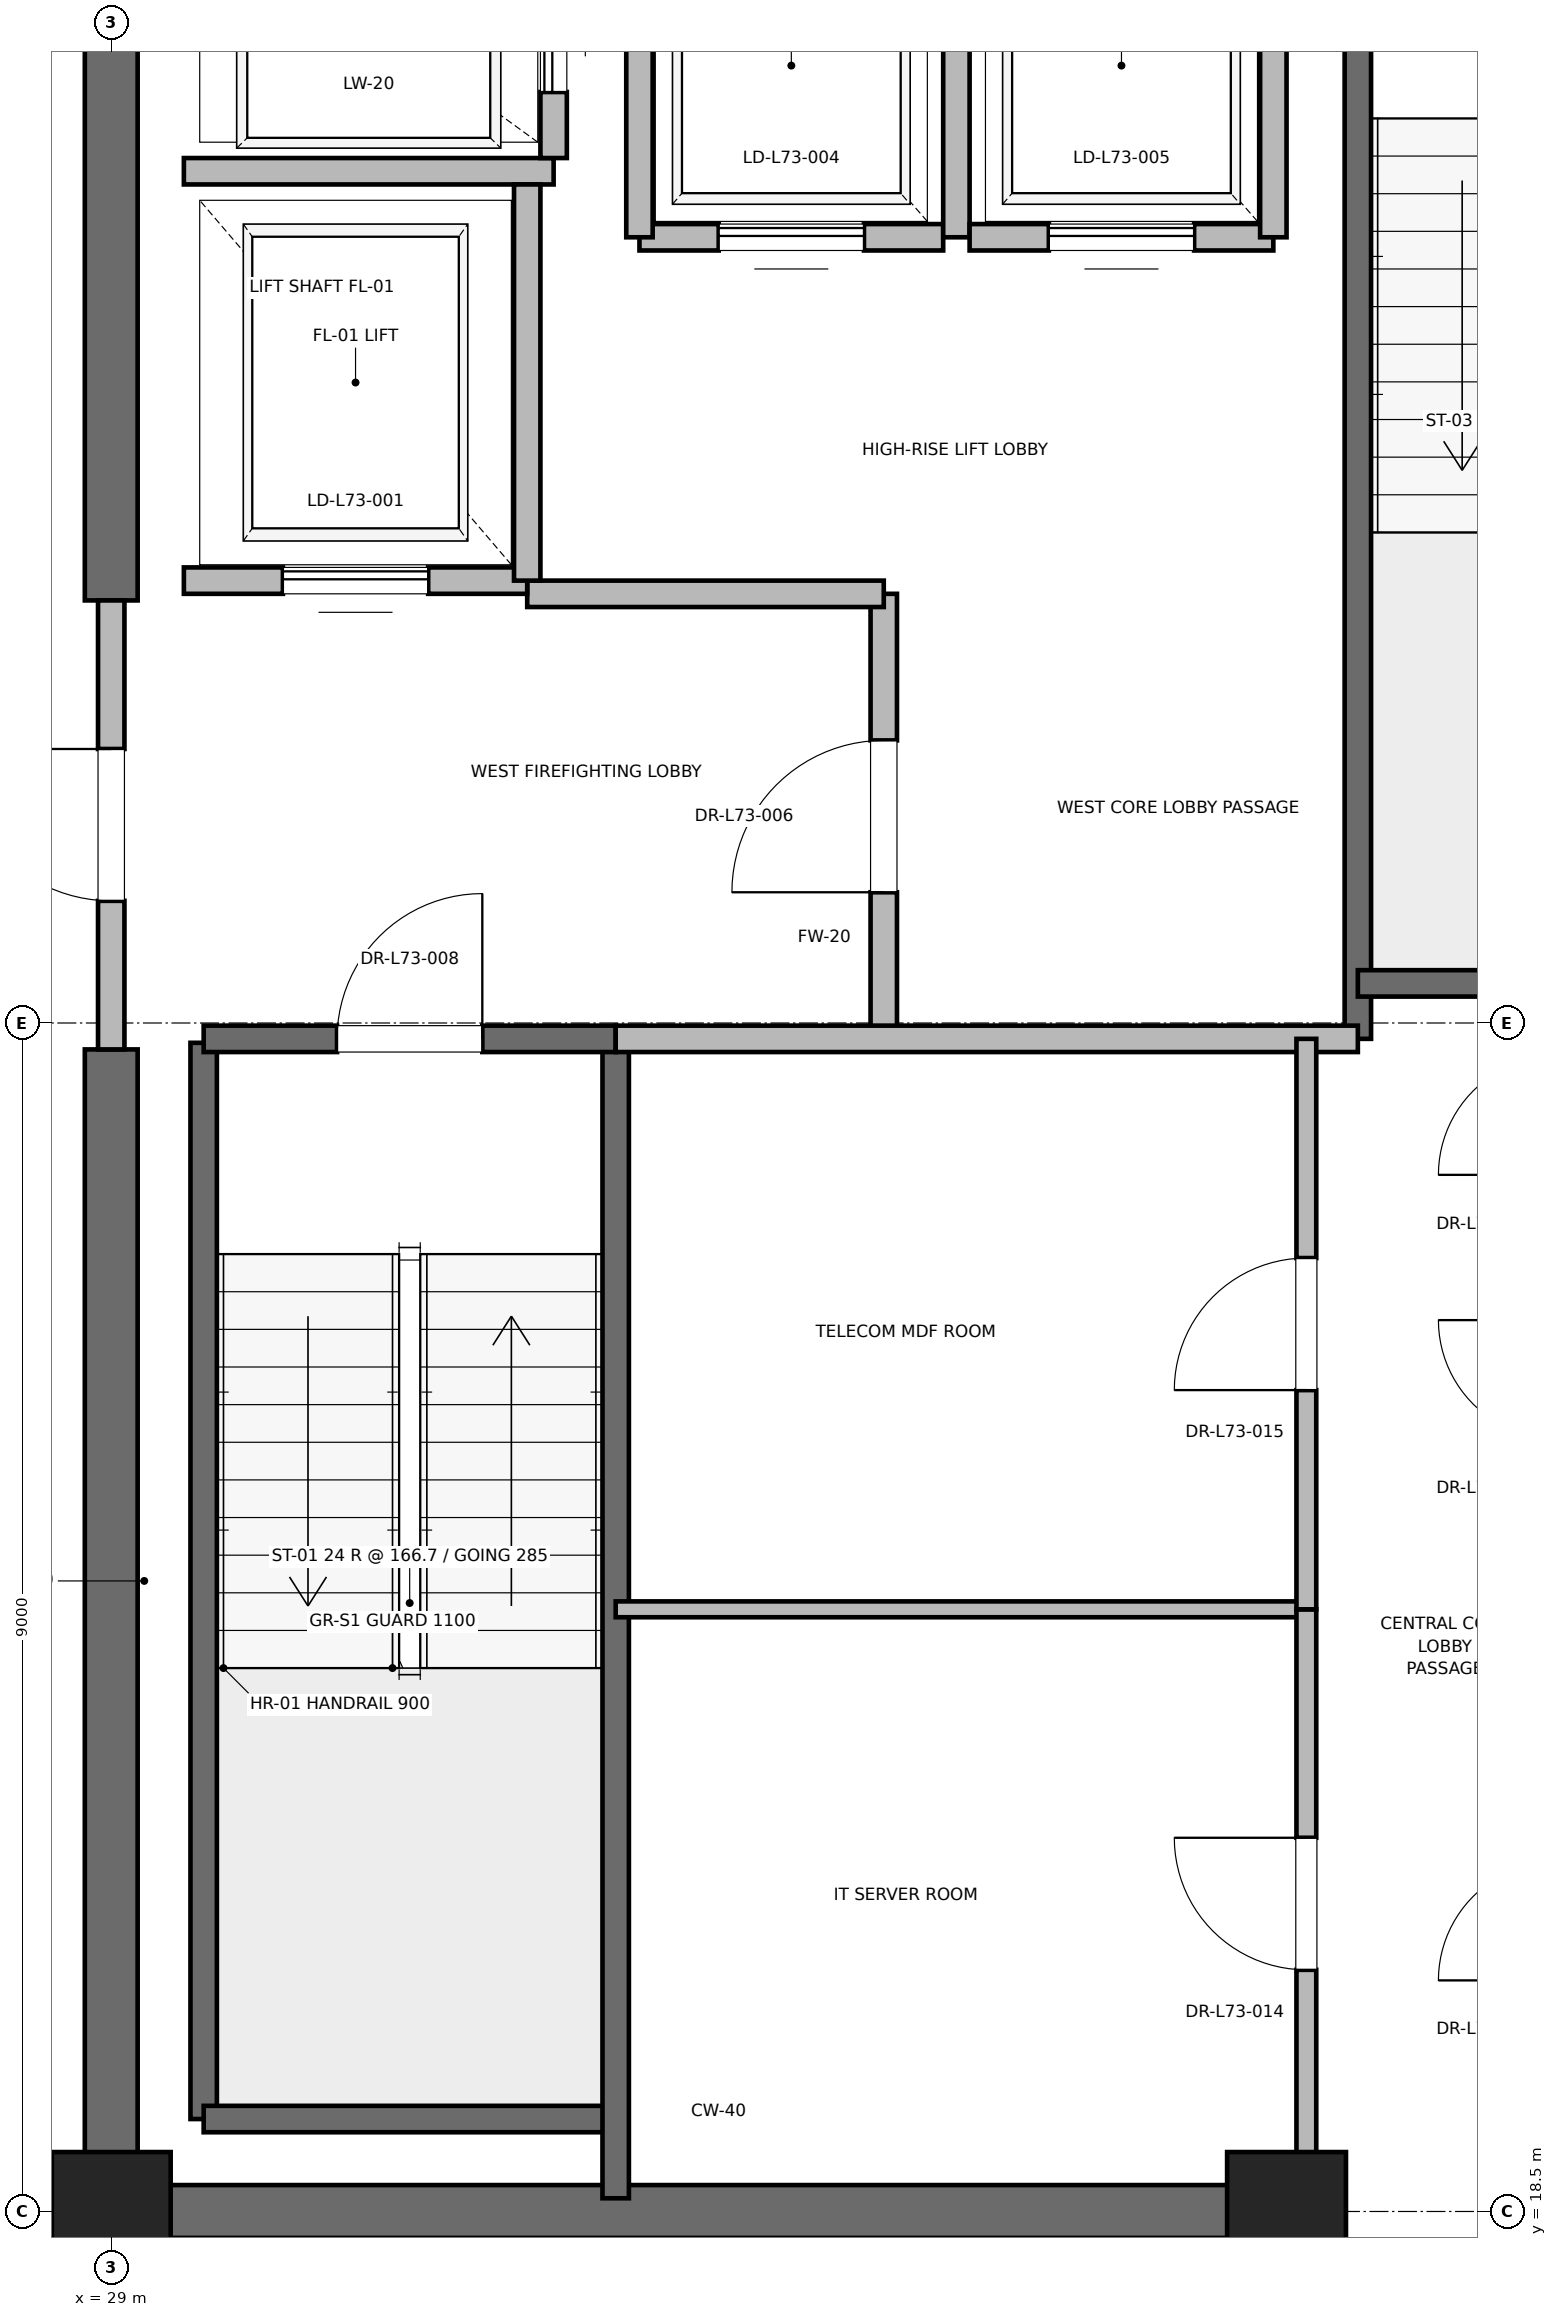
"""IFC4 building model, lengths in metres.
Left out: names, types, materials, properties, quantities, classifications, styles, units other than length and angle.
Written with IfcOpenShell. Run it as: python <this file> out.ifc"""

import sys

from ifc_helpers import new_model, si_unit, direction, frame, frame_2d, origin, origin_2d, place, context, subcontext, project, spatial, rectangle, extrude, element, fill, save


model = new_model("IFC4")
c1 = context("Model", 3, precision=1e-05, world=origin(), true_north=direction((0.0, 1.0)))
c2 = subcontext(c1, "Body", "Model", "MODEL_VIEW")
j1 = project(units=[si_unit("LENGTHUNIT", "METRE"), si_unit("PLANEANGLEUNIT", "RADIAN")], contexts=[c1])
p1 = place(None, origin())
s1 = spatial("IfcSite", under=j1, at=p1, CompositionType="ELEMENT")
p2 = place(p1, origin())
s2 = spatial("IfcBuilding", under=s1, at=p2, CompositionType="ELEMENT")
p3 = place(p2, frame((0.0, 0.0, 314.8)))
s3 = spatial("IfcBuildingStorey", under=s2, at=p3, CompositionType="ELEMENT", Elevation=314.8)
for number, where, z_axis, x_axis in (
    (1, (29.0, 18.5, 0.0), (0.0, 0.0, 1.0), (1.0, 0.0, 0.0)),
    (2, (37.9, 18.5, 0.0), (0.0, 0.0, 1.0), (1.0, 0.0, 0.0)),
):
    element("IfcColumn", number, at=place(p3, frame(where, z_axis=z_axis, x_axis=x_axis)), inside=s3, PredefinedType="PILASTER", context=c2, shape_type="SweptSolid", body=[
        extrude(rectangle(XDim=0.9, YDim=0.9, at=origin_2d()), origin(), (0.0, 0.0, 1.0), 4.0),
    ])
p4 = place(p3, frame((29.0, 18.5, 0.0), z_axis=(0.0, 0.0, 1.0), x_axis=(1.0, 0.0, 0.0)))
e3 = element("IfcWall", 3, at=p4, inside=s3, PredefinedType="SHEAR", context=c2, shape_type="SweptSolid", body=[
    extrude(rectangle(XDim=9.2, YDim=0.4, at=frame_2d((4.6, 0.0))), origin(), (0.0, 0.0, 1.0), 3.785),
])
p5 = place(p3, frame((29.0, 18.5, 0.0), z_axis=(0.0, 0.0, 1.0), x_axis=(0.0, 1.0, 0.0)))
e4 = element("IfcWall", 4, at=p5, inside=s3, PredefinedType="SHEAR", context=c2, shape_type="SweptSolid", body=[
    extrude(rectangle(XDim=8.8, YDim=0.4, at=frame_2d((4.4, 0.0))), origin(), (0.0, 0.0, 1.0), 3.785),
])
p6 = place(p3, frame((29.0, 30.7, 0.0), z_axis=(0.0, 0.0, 1.0), x_axis=(0.0, 1.0, 0.0)))
e5 = element("IfcWall", 5, at=p6, inside=s3, PredefinedType="SHEAR", context=c2, shape_type="SweptSolid", body=[
    extrude(rectangle(XDim=5.8, YDim=0.4, at=frame_2d((2.9, 0.0))), origin(), (0.0, 0.0, 1.0), 3.785),
])
p7 = place(p3, frame((29.7, 19.2, 0.0), z_axis=(0.0, 0.0, 1.0), x_axis=(0.0, 1.0, 0.0)))
e6 = element("IfcWall", 6, at=p7, inside=s3, PredefinedType="SOLIDWALL", context=c2, shape_type="SweptSolid", body=[
    extrude(rectangle(XDim=8.15, YDim=0.2, at=frame_2d((4.075, 0.0))), origin(), (0.0, 0.0, 1.0), 3.785),
])
p8 = place(p3, frame((29.7, 19.2, 0.0), z_axis=(0.0, 0.0, 1.0), x_axis=(1.0, 0.0, 0.0)))
e7 = element("IfcWall", 7, at=p8, inside=s3, PredefinedType="SOLIDWALL", context=c2, shape_type="SweptSolid", body=[
    extrude(rectangle(XDim=3.12, YDim=0.2, at=frame_2d((1.56, 0.0))), origin(), (0.0, 0.0, 1.0), 3.785),
])
p9 = place(p3, frame((32.82, 18.6, 0.0), z_axis=(0.0, 0.0, 1.0), x_axis=(0.0, 1.0, 0.0)))
e8 = element("IfcWall", 8, at=p9, inside=s3, PredefinedType="SOLIDWALL", context=c2, shape_type="SweptSolid", body=[
    extrude(rectangle(XDim=8.78, YDim=0.2, at=frame_2d((4.39, 0.0))), origin(), (0.0, 0.0, 1.0), 3.785),
])
p10 = place(p3, frame((29.7, 27.38, 0.0), z_axis=(0.0, 0.0, 1.0), x_axis=(1.0, 0.0, 0.0)))
e9 = element("IfcWall", 9, at=p10, inside=s3, PredefinedType="SOLIDWALL", context=c2, shape_type="SweptSolid", body=[
    extrude(rectangle(XDim=3.12, YDim=0.2, at=frame_2d((1.56, 0.0))), origin(), (0.0, 0.0, 1.0), 3.785),
])
p11 = place(p10, frame((1.01, 0.0, 0.0)))
e10 = element("IfcOpeningElement", 10, at=p11, cuts=e9, PredefinedType="OPENING", context=c2, shape_type="SweptSolid", body=[
    extrude(rectangle(XDim=1.1, YDim=2.15, at=frame_2d((0.55, 1.075))), frame((0.0, 0.1, 0.0), z_axis=(0.0, -1.0, 0.0), x_axis=(1.0, 0.0, 0.0)), (0.0, 0.0, 1.0), 0.2),
])
p12 = place(p3, frame((38.44, 27.38, 0.0), z_axis=(0.0, 0.0, 1.0), x_axis=(0.0, 1.0, 0.0)))
e11 = element("IfcWall", 11, at=p12, inside=s3, PredefinedType="SOLIDWALL", context=c2, shape_type="SweptSolid", body=[
    extrude(rectangle(XDim=8.87, YDim=0.2, at=frame_2d((4.435, 0.0))), origin(), (0.0, 0.0, 1.0), 3.785),
])
p13 = place(p3, frame((38.44, 27.8, 0.0), z_axis=(0.0, 0.0, 1.0), x_axis=(1.0, 0.0, 0.0)))
e12 = element("IfcWall", 12, at=p13, inside=s3, PredefinedType="SOLIDWALL", context=c2, shape_type="SweptSolid", body=[
    extrude(rectangle(XDim=3.32, YDim=0.2, at=frame_2d((1.66, 0.0))), origin(), (0.0, 0.0, 1.0), 3.785),
])
p14 = place(p3, frame((34.85, 27.38, 0.0), z_axis=(0.0, 0.0, 1.0), x_axis=(0.0, 1.0, 0.0)))
e13 = element("IfcWall", 13, at=p14, inside=s3, PredefinedType="PARTITIONING", context=c2, shape_type="SweptSolid", body=[
    extrude(rectangle(XDim=3.37, YDim=0.2, at=frame_2d((1.685, 0.0))), origin(), (0.0, 0.0, 1.0), 3.785),
])
p15 = place(p14, frame((1.11, 0.0, 0.0)))
e14 = element("IfcOpeningElement", 14, at=p15, cuts=e13, PredefinedType="OPENING", context=c2, shape_type="SweptSolid", body=[
    extrude(rectangle(XDim=1.15, YDim=2.2, at=frame_2d((0.575, 1.1))), frame((0.0, 0.1, 0.0), z_axis=(0.0, -1.0, 0.0), x_axis=(1.0, 0.0, 0.0)), (0.0, 0.0, 1.0), 0.2),
])
p16 = place(p3, frame((29.0, 27.3, 0.0), z_axis=(0.0, 0.0, 1.0), x_axis=(0.0, 1.0, 0.0)))
e15 = element("IfcWall", 15, at=p16, inside=s3, PredefinedType="PARTITIONING", context=c2, shape_type="SweptSolid", body=[
    extrude(rectangle(XDim=3.4, YDim=0.2, at=frame_2d((1.7, 0.0))), origin(), (0.0, 0.0, 1.0), 2.865),
])
p17 = place(p16, frame((1.125, 0.0, 0.0)))
e16 = element("IfcOpeningElement", 16, at=p17, cuts=e15, PredefinedType="OPENING", context=c2, shape_type="SweptSolid", body=[
    extrude(rectangle(XDim=1.15, YDim=2.2, at=frame_2d((0.575, 1.1))), frame((0.0, 0.1, 0.0), z_axis=(0.0, -1.0, 0.0), x_axis=(1.0, 0.0, 0.0)), (0.0, 0.0, 1.0), 0.2),
])
p18 = place(p3, frame((32.82, 27.38, 0.0), z_axis=(0.0, 0.0, 1.0), x_axis=(1.0, 0.0, 0.0)))
e17 = element("IfcWall", 17, at=p18, inside=s3, PredefinedType="PARTITIONING", context=c2, shape_type="SweptSolid", body=[
    extrude(rectangle(XDim=5.62, YDim=0.2, at=frame_2d((2.81, 0.0))), origin(), (0.0, 0.0, 1.0), 3.785),
])
p19 = place(p3, frame((32.15, 30.75, 0.0), z_axis=(0.0, 0.0, 1.0), x_axis=(1.0, 0.0, 0.0)))
e18 = element("IfcWall", 18, at=p19, inside=s3, PredefinedType="PARTITIONING", context=c2, shape_type="SweptSolid", body=[
    extrude(rectangle(XDim=2.7, YDim=0.2, at=frame_2d((1.35, 0.0))), origin(), (0.0, 0.0, 1.0), 3.785),
])
p20 = place(p3, frame((29.55, 30.85, 0.0), z_axis=(0.0, 0.0, 1.0), x_axis=(1.0, 0.0, 0.0)))
e19 = element("IfcWall", 19, at=p20, inside=s3, PredefinedType="SOLIDWALL", context=c2, shape_type="SweptSolid", body=[
    extrude(rectangle(XDim=2.6, YDim=0.2, at=frame_2d((1.3, 0.0))), origin(), (0.0, 0.0, 1.0), 2.865),
])
p21 = place(p20, frame((0.75, 0.0, 0.0)))
e20 = element("IfcOpeningElement", 20, at=p21, cuts=e19, PredefinedType="OPENING", context=c2, shape_type="SweptSolid", body=[
    extrude(rectangle(XDim=1.1, YDim=2.2, at=frame_2d((0.55, 1.1))), frame((0.0, 0.1, 0.0), z_axis=(0.0, -1.0, 0.0), x_axis=(1.0, 0.0, 0.0)), (0.0, 0.0, 1.0), 0.2),
])
p22 = place(p3, frame((29.55, 33.95, 0.0), z_axis=(0.0, 0.0, 1.0), x_axis=(1.0, 0.0, 0.0)))
e21 = element("IfcWall", 21, at=p22, inside=s3, PredefinedType="SOLIDWALL", context=c2, shape_type="SweptSolid", body=[
    extrude(rectangle(XDim=2.8, YDim=0.2, at=frame_2d((1.4, 0.0))), origin(), (0.0, 0.0, 1.0), 3.785),
])
p23 = place(p3, frame((32.15, 30.85, 0.0), z_axis=(0.0, 0.0, 1.0), x_axis=(0.0, 1.0, 0.0)))
e22 = element("IfcWall", 22, at=p23, inside=s3, PredefinedType="SOLIDWALL", context=c2, shape_type="SweptSolid", body=[
    extrude(rectangle(XDim=3.0, YDim=0.2, at=frame_2d((1.5, 0.0))), origin(), (0.0, 0.0, 1.0), 3.785),
])
p24 = place(p3, frame((32.35, 34.05, 0.0), z_axis=(0.0, 0.0, 1.0), x_axis=(0.0, 1.0, 0.0)))
e23 = element("IfcWall", 23, at=p24, inside=s3, PredefinedType="SOLIDWALL", context=c2, shape_type="SweptSolid", body=[
    extrude(rectangle(XDim=2.1, YDim=0.2, at=frame_2d((1.05, 0.0))), origin(), (0.0, 0.0, 1.0), 3.785),
])
p25 = place(p24, frame((0.5, 0.0, 0.0)))
e24 = element("IfcOpeningElement", 24, at=p25, cuts=e23, PredefinedType="OPENING", context=c2, shape_type="SweptSolid", body=[
    extrude(rectangle(XDim=1.1, YDim=2.2, at=frame_2d((0.55, 1.1))), frame((0.0, 0.1, 0.0), z_axis=(0.0, -1.0, 0.0), x_axis=(1.0, 0.0, 0.0)), (0.0, 0.0, 1.0), 0.2),
])
p26 = place(p3, frame((33.0, 33.45, 0.0), z_axis=(0.0, 0.0, 1.0), x_axis=(1.0, 0.0, 0.0)))
e25 = element("IfcWall", 25, at=p26, inside=s3, PredefinedType="SOLIDWALL", context=c2, shape_type="SweptSolid", body=[
    extrude(rectangle(XDim=2.3, YDim=0.2, at=frame_2d((1.15, 0.0))), origin(), (0.0, 0.0, 1.0), 3.785),
])
p27 = place(p26, frame((0.6, 0.0, 0.0)))
e26 = element("IfcOpeningElement", 26, at=p27, cuts=e25, PredefinedType="OPENING", context=c2, shape_type="SweptSolid", body=[
    extrude(rectangle(XDim=1.1, YDim=2.2, at=frame_2d((0.55, 1.1))), frame((0.0, 0.1, 0.0), z_axis=(0.0, -1.0, 0.0), x_axis=(1.0, 0.0, 0.0)), (0.0, 0.0, 1.0), 0.2),
])
p28 = place(p3, frame((33.0, 36.05, 0.0), z_axis=(0.0, 0.0, 1.0), x_axis=(0.0, -1.0, 0.0)))
e27 = element("IfcWall", 27, at=p28, inside=s3, PredefinedType="SOLIDWALL", context=c2, shape_type="SweptSolid", body=[
    extrude(rectangle(XDim=2.6, YDim=0.2, at=frame_2d((1.3, 0.0))), origin(), (0.0, 0.0, 1.0), 3.785),
])
p29 = place(p3, frame((35.4, 33.45, 0.0), z_axis=(0.0, 0.0, 1.0), x_axis=(0.0, 1.0, 0.0)))
e28 = element("IfcWall", 28, at=p29, inside=s3, PredefinedType="SOLIDWALL", context=c2, shape_type="SweptSolid", body=[
    extrude(rectangle(XDim=2.6, YDim=0.2, at=frame_2d((1.3, 0.0))), origin(), (0.0, 0.0, 1.0), 2.865),
])
p30 = place(p3, frame((35.5, 33.45, 0.0), z_axis=(0.0, 0.0, 1.0), x_axis=(1.0, 0.0, 0.0)))
e29 = element("IfcWall", 29, at=p30, inside=s3, PredefinedType="SOLIDWALL", context=c2, shape_type="SweptSolid", body=[
    extrude(rectangle(XDim=2.3, YDim=0.2, at=frame_2d((1.15, 0.0))), origin(), (0.0, 0.0, 1.0), 3.785),
])
p31 = place(p30, frame((0.6, 0.0, 0.0)))
e30 = element("IfcOpeningElement", 30, at=p31, cuts=e29, PredefinedType="OPENING", context=c2, shape_type="SweptSolid", body=[
    extrude(rectangle(XDim=1.1, YDim=2.2, at=frame_2d((0.55, 1.1))), frame((0.0, 0.1, 0.0), z_axis=(0.0, -1.0, 0.0), x_axis=(1.0, 0.0, 0.0)), (0.0, 0.0, 1.0), 0.2),
])
p32 = place(p3, frame((37.8, 33.45, 0.0), z_axis=(0.0, 0.0, 1.0), x_axis=(0.0, 1.0, 0.0)))
e31 = element("IfcWall", 31, at=p32, inside=s3, PredefinedType="SOLIDWALL", context=c2, shape_type="SweptSolid", body=[
    extrude(rectangle(XDim=2.6, YDim=0.2, at=frame_2d((1.3, 0.0))), origin(), (0.0, 0.0, 1.0), 2.865),
])
p33 = place(p3, frame((32.82, 23.06, 0.0), z_axis=(0.0, 0.0, 1.0), x_axis=(1.0, 0.0, 0.0)))
e32 = element("IfcWall", 32, at=p33, inside=s3, PredefinedType="PARTITIONING", context=c2, shape_type="SweptSolid", body=[
    extrude(rectangle(XDim=5.23, YDim=0.12, at=frame_2d((2.615, 0.0))), origin(), (0.0, 0.0, 1.0), 2.85),
])
p34 = place(p3, frame((38.05, 18.6, 0.0), z_axis=(0.0, 0.0, 1.0), x_axis=(0.0, 1.0, 0.0)))
e33 = element("IfcWall", 33, at=p34, inside=s3, PredefinedType="PARTITIONING", context=c2, shape_type="SweptSolid", body=[
    extrude(rectangle(XDim=4.46, YDim=0.15, at=frame_2d((2.23, 0.0))), origin(), (0.0, 0.0, 1.0), 2.85),
])
p35 = place(p34, frame((1.73, 0.0, 0.0)))
e34 = element("IfcOpeningElement", 34, at=p35, cuts=e33, PredefinedType="OPENING", context=c2, shape_type="SweptSolid", body=[
    extrude(rectangle(XDim=1.0, YDim=2.15, at=frame_2d((0.5, 1.075))), frame((0.0, 0.075, 0.0), z_axis=(0.0, -1.0, 0.0), x_axis=(1.0, 0.0, 0.0)), (0.0, 0.0, 1.0), 0.15),
])
p36 = place(p3, frame((38.05, 23.06, 0.0), z_axis=(0.0, 0.0, 1.0), x_axis=(0.0, 1.0, 0.0)))
e35 = element("IfcWall", 35, at=p36, inside=s3, PredefinedType="PARTITIONING", context=c2, shape_type="SweptSolid", body=[
    extrude(rectangle(XDim=4.32, YDim=0.15, at=frame_2d((2.16, 0.0))), origin(), (0.0, 0.0, 1.0), 2.85),
])
p37 = place(p36, frame((1.66, 0.0, 0.0)))
e36 = element("IfcOpeningElement", 36, at=p37, cuts=e35, PredefinedType="OPENING", context=c2, shape_type="SweptSolid", body=[
    extrude(rectangle(XDim=1.0, YDim=2.15, at=frame_2d((0.5, 1.075))), frame((0.0, 0.075, 0.0), z_axis=(0.0, -1.0, 0.0), x_axis=(1.0, 0.0, 0.0)), (0.0, 0.0, 1.0), 0.15),
])
p38 = place(p11, origin())
e37 = element("IfcDoor", 37, at=p38, inside=s3, OperationType="SINGLE_SWING_RIGHT", PredefinedType="DOOR", context=c2, shape_type="SweptSolid", body=[
    extrude(rectangle(XDim=1.1, YDim=2.15, at=frame_2d((0.55, 1.075))), frame((0.0, 0.025, 0.0), z_axis=(0.0, -1.0, 0.0), x_axis=(1.0, 0.0, 0.0)), (0.0, 0.0, 1.0), 0.05),
])
fill(e10, e37)
p39 = place(p15, origin())
e38 = element("IfcDoor", 38, at=p39, inside=s3, OperationType="SINGLE_SWING_LEFT", PredefinedType="DOOR", context=c2, shape_type="SweptSolid", body=[
    extrude(rectangle(XDim=1.15, YDim=2.2, at=frame_2d((0.575, 1.1))), frame((0.0, 0.025, 0.0), z_axis=(0.0, -1.0, 0.0), x_axis=(1.0, 0.0, 0.0)), (0.0, 0.0, 1.0), 0.05),
])
fill(e14, e38)
p40 = place(p17, origin())
e39 = element("IfcDoor", 39, at=p40, inside=s3, OperationType="SINGLE_SWING_RIGHT", PredefinedType="DOOR", context=c2, shape_type="SweptSolid", body=[
    extrude(rectangle(XDim=1.15, YDim=2.2, at=frame_2d((0.575, 1.1))), frame((0.0, 0.025, 0.0), z_axis=(0.0, -1.0, 0.0), x_axis=(1.0, 0.0, 0.0)), (0.0, 0.0, 1.0), 0.05),
])
fill(e16, e39)
p41 = place(p21, origin())
e40 = element("IfcDoor", 40, at=p41, inside=s3, OperationType="SLIDING_TO_RIGHT", PredefinedType="DOOR", context=c2, shape_type="SweptSolid", body=[
    extrude(rectangle(XDim=1.1, YDim=2.2, at=frame_2d((0.55, 1.1))), frame((0.0, 0.025, 0.0), z_axis=(0.0, -1.0, 0.0), x_axis=(1.0, 0.0, 0.0)), (0.0, 0.0, 1.0), 0.05),
])
fill(e20, e40)
p42 = place(p25, origin())
e41 = element("IfcDoor", 41, at=p42, inside=s3, OperationType="SLIDING_TO_RIGHT", PredefinedType="DOOR", context=c2, shape_type="SweptSolid", body=[
    extrude(rectangle(XDim=1.1, YDim=2.2, at=frame_2d((0.55, 1.1))), frame((0.0, 0.025, 0.0), z_axis=(0.0, -1.0, 0.0), x_axis=(1.0, 0.0, 0.0)), (0.0, 0.0, 1.0), 0.05),
])
fill(e24, e41)
p43 = place(p27, origin())
e42 = element("IfcDoor", 42, at=p43, inside=s3, OperationType="SLIDING_TO_RIGHT", PredefinedType="DOOR", context=c2, shape_type="SweptSolid", body=[
    extrude(rectangle(XDim=1.1, YDim=2.2, at=frame_2d((0.55, 1.1))), frame((0.0, 0.025, 0.0), z_axis=(0.0, -1.0, 0.0), x_axis=(1.0, 0.0, 0.0)), (0.0, 0.0, 1.0), 0.05),
])
fill(e26, e42)
p44 = place(p31, origin())
e43 = element("IfcDoor", 43, at=p44, inside=s3, OperationType="SLIDING_TO_RIGHT", PredefinedType="DOOR", context=c2, shape_type="SweptSolid", body=[
    extrude(rectangle(XDim=1.1, YDim=2.2, at=frame_2d((0.55, 1.1))), frame((0.0, 0.025, 0.0), z_axis=(0.0, -1.0, 0.0), x_axis=(1.0, 0.0, 0.0)), (0.0, 0.0, 1.0), 0.05),
])
fill(e30, e43)
p45 = place(p35, origin())
e44 = element("IfcDoor", 44, at=p45, inside=s3, OperationType="SINGLE_SWING_RIGHT", PredefinedType="DOOR", context=c2, shape_type="SweptSolid", body=[
    extrude(rectangle(XDim=1.0, YDim=2.15, at=frame_2d((0.5, 1.075))), frame((0.0, 0.025, 0.0), z_axis=(0.0, -1.0, 0.0), x_axis=(1.0, 0.0, 0.0)), (0.0, 0.0, 1.0), 0.05),
])
fill(e34, e44)
p46 = place(p37, origin())
e45 = element("IfcDoor", 45, at=p46, inside=s3, OperationType="SINGLE_SWING_LEFT", PredefinedType="DOOR", context=c2, shape_type="SweptSolid", body=[
    extrude(rectangle(XDim=1.0, YDim=2.15, at=frame_2d((0.5, 1.075))), frame((0.0, 0.025, 0.0), z_axis=(0.0, -1.0, 0.0), x_axis=(1.0, 0.0, 0.0)), (0.0, 0.0, 1.0), 0.05),
])
fill(e36, e45)
save(model, sys.argv[1])
